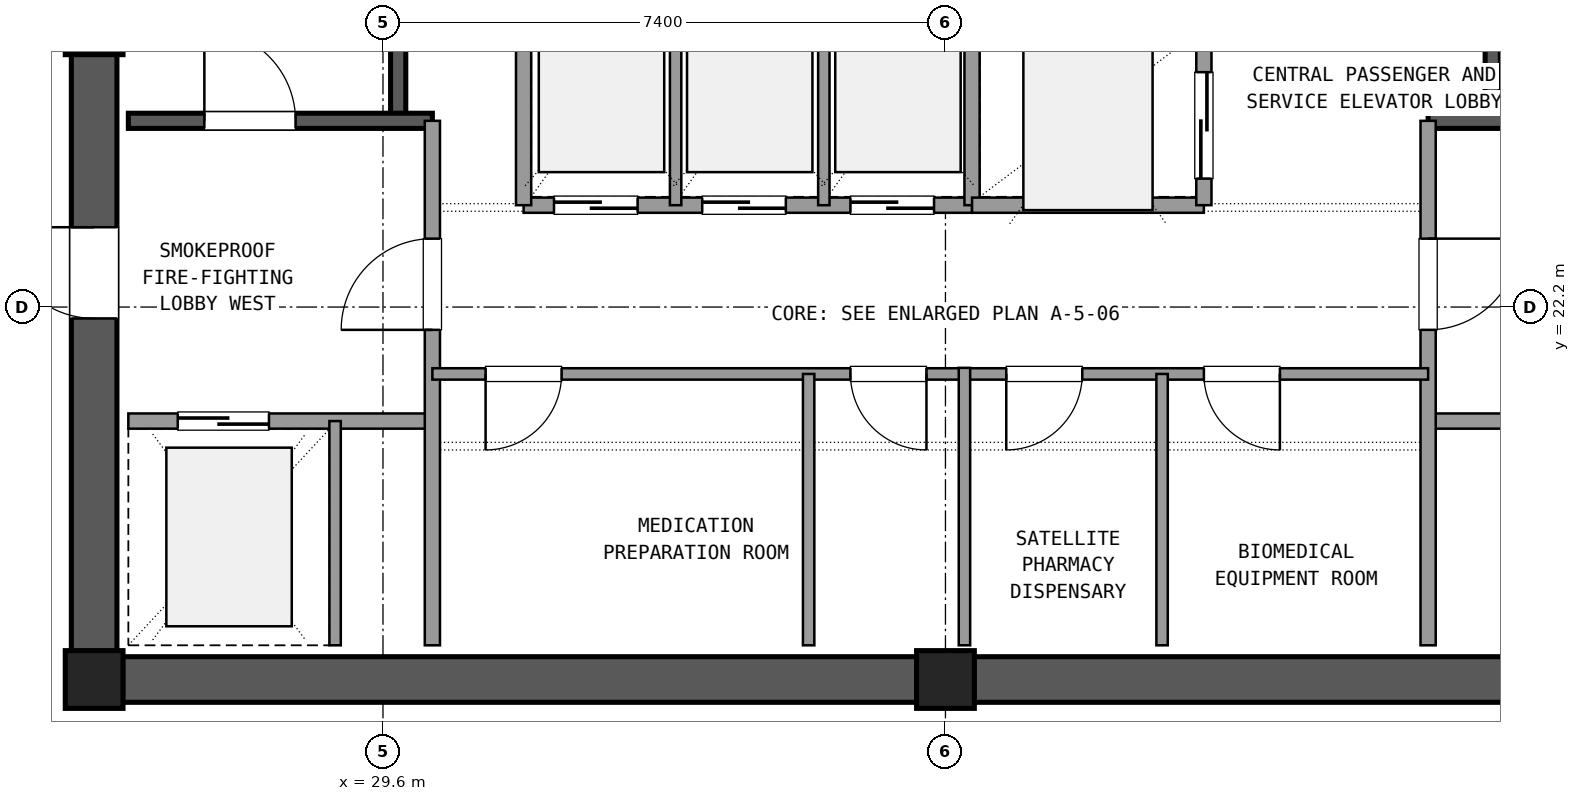
"""IFC4 building model, lengths in metres.
Left out: names, types, materials, properties, quantities, classifications, styles, units other than length and angle.
Written with IfcOpenShell. Run it as: python <this file> out.ifc"""

import sys

from ifc_helpers import new_model, si_unit, direction, frame, frame_2d, origin, origin_2d, place, context, subcontext, project, spatial, rectangle, extrude, element, fill, save


model = new_model("IFC4")
c1 = context("Model", 3, precision=1e-05, world=origin(), true_north=direction((0.0, 1.0)))
c2 = subcontext(c1, "Body", "Model", "MODEL_VIEW")
j1 = project(units=[si_unit("LENGTHUNIT", "METRE"), si_unit("PLANEANGLEUNIT", "RADIAN")], contexts=[c1])
p1 = place(None, origin())
s1 = spatial("IfcSite", under=j1, at=p1, CompositionType="ELEMENT")
p2 = place(p1, origin())
s2 = spatial("IfcBuilding", under=s1, at=p2, CompositionType="ELEMENT")
p3 = place(p2, frame((0.0, 0.0, 286.02)))
s3 = spatial("IfcBuildingStorey", under=s2, at=p3, CompositionType="ELEMENT", Elevation=286.02)
for number, where, z_axis, x_axis in (
    (1, (25.8, 17.3, 0.0), (0.0, 0.0, 1.0), (1.0, 0.0, 0.0)),
    (2, (37.0, 17.3, 0.0), (0.0, 0.0, 1.0), (1.0, 0.0, 0.0)),
    (3, (25.8, 25.9, 0.0), (0.0, 0.0, 1.0), (1.0, 0.0, 0.0)),
):
    element("IfcColumn", number, at=place(p3, frame(where, z_axis=z_axis, x_axis=x_axis)), inside=s3, PredefinedType="COLUMN", context=c2, shape_type="SweptSolid", body=[
        extrude(rectangle(XDim=0.76, YDim=0.76, at=origin_2d()), origin(), (0.0, 0.0, 1.0), 4.32),
    ])
for number, where, z_axis, x_axis in (
    (4, (26.175, 17.3, 0.0), (0.0, 0.0, 1.0), (1.0, 0.0, 0.0)),
    (5, (37.375, 17.3, 0.0), (0.0, 0.0, 1.0), (1.0, 0.0, 0.0)),
):
    element("IfcWall", number, at=place(p3, frame(where, z_axis=z_axis, x_axis=x_axis)), inside=s3, PredefinedType="SHEAR", context=c2, shape_type="SweptSolid", body=[
        extrude(rectangle(XDim=10.45, YDim=0.6, at=frame_2d((5.225, 0.0))), origin(), (0.0, 0.0, 1.0), 4.02),
    ])
p4 = place(p3, frame((25.8, 25.525, 0.0), z_axis=(0.0, 0.0, 1.0), x_axis=(0.0, -1.0, 0.0)))
e6 = element("IfcWall", 6, at=p4, inside=s3, PredefinedType="SHEAR", context=c2, shape_type="SweptSolid", body=[
    extrude(rectangle(XDim=7.85, YDim=0.6, at=frame_2d((3.925, 0.0))), origin(), (0.0, 0.0, 1.0), 4.02),
])
p5 = place(p4, frame((2.275, 0.0, 0.0)))
e7 = element("IfcOpeningElement", 7, at=p5, cuts=e6, PredefinedType="OPENING", context=c2, shape_type="SweptSolid", body=[
    extrude(rectangle(XDim=1.2, YDim=2.15, at=frame_2d((0.6, 1.075))), frame((0.0, 0.31, 0.0), z_axis=(0.0, -1.0, 0.0), x_axis=(1.0, 0.0, 0.0)), (0.0, 0.0, 1.0), 0.62),
])
p6 = place(p3, frame((29.8, 24.65, 0.0), z_axis=(0.0, 0.0, 1.0), x_axis=(0.0, 1.0, 0.0)))
e8 = element("IfcWall", 8, at=p6, inside=s3, PredefinedType="SHEAR", context=c2, shape_type="SweptSolid", body=[
    extrude(rectangle(XDim=9.4, YDim=0.2, at=frame_2d((4.7, 0.0))), origin(), (0.0, 0.0, 1.0), 4.02),
])
p7 = place(p3, frame((26.25, 24.65, 0.0), z_axis=(0.0, 0.0, 1.0), x_axis=(1.0, 0.0, 0.0)))
e9 = element("IfcWall", 9, at=p7, inside=s3, PredefinedType="SHEAR", context=c2, shape_type="SweptSolid", body=[
    extrude(rectangle(XDim=4.0, YDim=0.2, at=frame_2d((2.0, 0.0))), origin(), (0.0, 0.0, 1.0), 4.02),
])
p8 = place(p7, frame((1.0, 0.0, 0.0)))
e10 = element("IfcOpeningElement", 10, at=p8, cuts=e9, PredefinedType="OPENING", context=c2, shape_type="SweptSolid", body=[
    extrude(rectangle(XDim=1.2, YDim=2.15, at=frame_2d((0.6, 1.075))), frame((0.0, 0.11, 0.0), z_axis=(0.0, -1.0, 0.0), x_axis=(1.0, 0.0, 0.0)), (0.0, 0.0, 1.0), 0.22),
])
p9 = place(p3, frame((44.2, 24.65, 0.0), z_axis=(0.0, 0.0, 1.0), x_axis=(0.0, 1.0, 0.0)))
e11 = element("IfcWall", 11, at=p9, inside=s3, PredefinedType="SHEAR", context=c2, shape_type="SweptSolid", body=[
    extrude(rectangle(XDim=9.4, YDim=0.2, at=frame_2d((4.7, 0.0))), origin(), (0.0, 0.0, 1.0), 4.02),
])
p10 = place(p3, frame((43.35, 24.65, 0.0), z_axis=(0.0, 0.0, 1.0), x_axis=(1.0, 0.0, 0.0)))
e12 = element("IfcWall", 12, at=p10, inside=s3, PredefinedType="SHEAR", context=c2, shape_type="SweptSolid", body=[
    extrude(rectangle(XDim=4.4, YDim=0.2, at=frame_2d((2.2, 0.0))), origin(), (0.0, 0.0, 1.0), 4.02),
])
p11 = place(p10, frame((2.0, 0.0, 0.0)))
e13 = element("IfcOpeningElement", 13, at=p11, cuts=e12, PredefinedType="OPENING", context=c2, shape_type="SweptSolid", body=[
    extrude(rectangle(XDim=1.2, YDim=2.15, at=frame_2d((0.6, 1.075))), frame((0.0, 0.11, 0.0), z_axis=(0.0, -1.0, 0.0), x_axis=(1.0, 0.0, 0.0)), (0.0, 0.0, 1.0), 0.22),
])
p12 = place(p3, frame((26.25, 20.7, 0.0), z_axis=(0.0, 0.0, 1.0), x_axis=(1.0, 0.0, 0.0)))
e14 = element("IfcWall", 14, at=p12, inside=s3, PredefinedType="SOLIDWALL", context=c2, shape_type="SweptSolid", body=[
    extrude(rectangle(XDim=4.0, YDim=0.2, at=frame_2d((2.0, 0.0))), origin(), (0.0, 0.0, 1.0), 2.93),
])
p13 = place(p12, frame((0.65, 0.0, 0.0)))
e15 = element("IfcOpeningElement", 15, at=p13, cuts=e14, PredefinedType="OPENING", context=c2, shape_type="SweptSolid", body=[
    extrude(rectangle(XDim=1.2, YDim=2.15, at=frame_2d((0.6, 1.075))), frame((0.0, 0.11, 0.0), z_axis=(0.0, -1.0, 0.0), x_axis=(1.0, 0.0, 0.0)), (0.0, 0.0, 1.0), 0.22),
])
p14 = place(p3, frame((30.25, 17.75, 0.0), z_axis=(0.0, 0.0, 1.0), x_axis=(0.0, 1.0, 0.0)))
e16 = element("IfcWall", 16, at=p14, inside=s3, PredefinedType="SOLIDWALL", context=c2, shape_type="SweptSolid", body=[
    extrude(rectangle(XDim=6.9, YDim=0.2, at=frame_2d((3.45, 0.0))), origin(), (0.0, 0.0, 1.0), 2.93),
])
p15 = place(p14, frame((4.15, 0.0, 0.0)))
e17 = element("IfcOpeningElement", 17, at=p15, cuts=e16, PredefinedType="OPENING", context=c2, shape_type="SweptSolid", body=[
    extrude(rectangle(XDim=1.2, YDim=2.15, at=frame_2d((0.6, 1.075))), frame((0.0, 0.11, 0.0), z_axis=(0.0, -1.0, 0.0), x_axis=(1.0, 0.0, 0.0)), (0.0, 0.0, 1.0), 0.22),
])
p16 = place(p3, frame((28.97, 17.75, 0.0), z_axis=(0.0, 0.0, 1.0), x_axis=(0.0, 1.0, 0.0)))
e18 = element("IfcWall", 18, at=p16, inside=s3, PredefinedType="PARTITIONING", context=c2, shape_type="SweptSolid", body=[
    extrude(rectangle(XDim=2.95, YDim=0.15, at=frame_2d((1.475, 0.0))), origin(), (0.0, 0.0, 1.0), 2.93),
])
p17 = place(p3, frame((43.35, 20.7, 0.0), z_axis=(0.0, 0.0, 1.0), x_axis=(1.0, 0.0, 0.0)))
e19 = element("IfcWall", 19, at=p17, inside=s3, PredefinedType="SOLIDWALL", context=c2, shape_type="SweptSolid", body=[
    extrude(rectangle(XDim=4.4, YDim=0.2, at=frame_2d((2.2, 0.0))), origin(), (0.0, 0.0, 1.0), 2.93),
])
p18 = place(p17, frame((2.35, 0.0, 0.0)))
e20 = element("IfcOpeningElement", 20, at=p18, cuts=e19, PredefinedType="OPENING", context=c2, shape_type="SweptSolid", body=[
    extrude(rectangle(XDim=1.2, YDim=2.15, at=frame_2d((0.6, 1.075))), frame((0.0, 0.11, 0.0), z_axis=(0.0, -1.0, 0.0), x_axis=(1.0, 0.0, 0.0)), (0.0, 0.0, 1.0), 0.22),
])
p19 = place(p3, frame((43.35, 17.75, 0.0), z_axis=(0.0, 0.0, 1.0), x_axis=(0.0, 1.0, 0.0)))
e21 = element("IfcWall", 21, at=p19, inside=s3, PredefinedType="SOLIDWALL", context=c2, shape_type="SweptSolid", body=[
    extrude(rectangle(XDim=6.9, YDim=0.2, at=frame_2d((3.45, 0.0))), origin(), (0.0, 0.0, 1.0), 2.93),
])
p20 = place(p19, frame((4.15, 0.0, 0.0)))
e22 = element("IfcOpeningElement", 22, at=p20, cuts=e21, PredefinedType="OPENING", context=c2, shape_type="SweptSolid", body=[
    extrude(rectangle(XDim=1.2, YDim=2.15, at=frame_2d((0.6, 1.075))), frame((0.0, 0.11, 0.0), z_axis=(0.0, -1.0, 0.0), x_axis=(1.0, 0.0, 0.0)), (0.0, 0.0, 1.0), 0.22),
])
p21 = place(p3, frame((30.25, 21.32, 0.0), z_axis=(0.0, 0.0, 1.0), x_axis=(1.0, 0.0, 0.0)))
e23 = element("IfcWall", 23, at=p21, inside=s3, PredefinedType="PARTITIONING", context=c2, shape_type="SweptSolid", body=[
    extrude(rectangle(XDim=7.0, YDim=0.15, at=frame_2d((3.5, 0.0))), origin(), (0.0, 0.0, 1.0), 2.93),
])
p22 = place(p21, frame((0.7, 0.0, 0.0)))
e24 = element("IfcOpeningElement", 24, at=p22, cuts=e23, PredefinedType="OPENING", context=c2, shape_type="SweptSolid", body=[
    extrude(rectangle(XDim=1.0, YDim=2.15, at=frame_2d((0.5, 1.075))), frame((0.0, 0.085, 0.0), z_axis=(0.0, -1.0, 0.0), x_axis=(1.0, 0.0, 0.0)), (0.0, 0.0, 1.0), 0.17),
])
p23 = place(p21, frame((5.5, 0.0, 0.0)))
e25 = element("IfcOpeningElement", 25, at=p23, cuts=e23, PredefinedType="OPENING", context=c2, shape_type="SweptSolid", body=[
    extrude(rectangle(XDim=1.0, YDim=2.15, at=frame_2d((0.5, 1.075))), frame((0.0, 0.085, 0.0), z_axis=(0.0, -1.0, 0.0), x_axis=(1.0, 0.0, 0.0)), (0.0, 0.0, 1.0), 0.17),
])
p24 = place(p3, frame((35.2, 17.75, 0.0), z_axis=(0.0, 0.0, 1.0), x_axis=(0.0, 1.0, 0.0)))
e26 = element("IfcWall", 26, at=p24, inside=s3, PredefinedType="PARTITIONING", context=c2, shape_type="SweptSolid", body=[
    extrude(rectangle(XDim=3.57, YDim=0.15, at=frame_2d((1.785, 0.0))), origin(), (0.0, 0.0, 1.0), 2.93),
])
p25 = place(p3, frame((37.25, 21.32, 0.0), z_axis=(0.0, 0.0, 1.0), x_axis=(1.0, 0.0, 0.0)))
e27 = element("IfcWall", 27, at=p25, inside=s3, PredefinedType="PARTITIONING", context=c2, shape_type="SweptSolid", body=[
    extrude(rectangle(XDim=6.1, YDim=0.15, at=frame_2d((3.05, 0.0))), origin(), (0.0, 0.0, 1.0), 2.93),
])
p26 = place(p25, frame((0.55, 0.0, 0.0)))
e28 = element("IfcOpeningElement", 28, at=p26, cuts=e27, PredefinedType="OPENING", context=c2, shape_type="SweptSolid", body=[
    extrude(rectangle(XDim=1.0, YDim=2.15, at=frame_2d((0.5, 1.075))), frame((0.0, 0.085, 0.0), z_axis=(0.0, -1.0, 0.0), x_axis=(1.0, 0.0, 0.0)), (0.0, 0.0, 1.0), 0.17),
])
p27 = place(p25, frame((3.15, 0.0, 0.0)))
e29 = element("IfcOpeningElement", 29, at=p27, cuts=e27, PredefinedType="OPENING", context=c2, shape_type="SweptSolid", body=[
    extrude(rectangle(XDim=1.0, YDim=2.15, at=frame_2d((0.5, 1.075))), frame((0.0, 0.085, 0.0), z_axis=(0.0, -1.0, 0.0), x_axis=(1.0, 0.0, 0.0)), (0.0, 0.0, 1.0), 0.17),
])
p28 = place(p3, frame((39.85, 17.75, 0.0), z_axis=(0.0, 0.0, 1.0), x_axis=(0.0, 1.0, 0.0)))
e30 = element("IfcWall", 30, at=p28, inside=s3, PredefinedType="PARTITIONING", context=c2, shape_type="SweptSolid", body=[
    extrude(rectangle(XDim=3.57, YDim=0.15, at=frame_2d((1.785, 0.0))), origin(), (0.0, 0.0, 1.0), 2.93),
])
p29 = place(p3, frame((37.25, 17.75, 0.0), z_axis=(0.0, 0.0, 1.0), x_axis=(0.0, 1.0, 0.0)))
e31 = element("IfcWall", 31, at=p29, inside=s3, PredefinedType="PARTITIONING", context=c2, shape_type="SweptSolid", body=[
    extrude(rectangle(XDim=3.65, YDim=0.15, at=frame_2d((1.825, 0.0))), origin(), (0.0, 0.0, 1.0), 2.93),
])
p30 = place(p3, frame((31.45, 23.54, 0.0), z_axis=(0.0, 0.0, 1.0), x_axis=(1.0, 0.0, 0.0)))
e32 = element("IfcWall", 32, at=p30, inside=s3, PredefinedType="SOLIDWALL", context=c2, shape_type="SweptSolid", body=[
    extrude(rectangle(XDim=5.9, YDim=0.2, at=frame_2d((2.95, 0.0))), origin(), (0.0, 0.0, 1.0), 2.93),
])
p31 = place(p30, frame((0.4, 0.0, 0.0)))
e33 = element("IfcOpeningElement", 33, at=p31, cuts=e32, PredefinedType="OPENING", context=c2, shape_type="SweptSolid", body=[
    extrude(rectangle(XDim=1.1, YDim=2.15, at=frame_2d((0.55, 1.075))), frame((0.0, 0.11, 0.0), z_axis=(0.0, -1.0, 0.0), x_axis=(1.0, 0.0, 0.0)), (0.0, 0.0, 1.0), 0.22),
])
p32 = place(p30, frame((2.35, 0.0, 0.0)))
e34 = element("IfcOpeningElement", 34, at=p32, cuts=e32, PredefinedType="OPENING", context=c2, shape_type="SweptSolid", body=[
    extrude(rectangle(XDim=1.1, YDim=2.15, at=frame_2d((0.55, 1.075))), frame((0.0, 0.11, 0.0), z_axis=(0.0, -1.0, 0.0), x_axis=(1.0, 0.0, 0.0)), (0.0, 0.0, 1.0), 0.22),
])
p33 = place(p30, frame((4.3, 0.0, 0.0)))
e35 = element("IfcOpeningElement", 35, at=p33, cuts=e32, PredefinedType="OPENING", context=c2, shape_type="SweptSolid", body=[
    extrude(rectangle(XDim=1.1, YDim=2.15, at=frame_2d((0.55, 1.075))), frame((0.0, 0.11, 0.0), z_axis=(0.0, -1.0, 0.0), x_axis=(1.0, 0.0, 0.0)), (0.0, 0.0, 1.0), 0.22),
])
p34 = place(p3, frame((31.45, 23.54, 0.0), z_axis=(0.0, 0.0, 1.0), x_axis=(0.0, 1.0, 0.0)))
e36 = element("IfcWall", 36, at=p34, inside=s3, PredefinedType="SOLIDWALL", context=c2, shape_type="SweptSolid", body=[
    extrude(rectangle(XDim=2.81, YDim=0.2, at=frame_2d((1.405, 0.0))), origin(), (0.0, 0.0, 1.0), 2.93),
])
for number, where, z_axis, x_axis in (
    (37, (33.45, 23.54, 0.0), (0.0, 0.0, 1.0), (0.0, 1.0, 0.0)),
    (38, (35.4, 23.54, 0.0), (0.0, 0.0, 1.0), (0.0, 1.0, 0.0)),
):
    element("IfcWall", number, at=place(p3, frame(where, z_axis=z_axis, x_axis=x_axis)), inside=s3, PredefinedType="PARTITIONING", context=c2, shape_type="SweptSolid", body=[
        extrude(rectangle(XDim=2.81, YDim=0.15, at=frame_2d((1.405, 0.0))), origin(), (0.0, 0.0, 1.0), 2.93),
    ])
p35 = place(p3, frame((37.35, 23.54, 0.0), z_axis=(0.0, 0.0, 1.0), x_axis=(0.0, 1.0, 0.0)))
e39 = element("IfcWall", 39, at=p35, inside=s3, PredefinedType="SOLIDWALL", context=c2, shape_type="SweptSolid", body=[
    extrude(rectangle(XDim=6.82, YDim=0.2, at=frame_2d((3.41, 0.0))), origin(), (0.0, 0.0, 1.0), 2.93),
])
p36 = place(p3, frame((37.35, 23.54, 0.0), z_axis=(0.0, 0.0, 1.0), x_axis=(1.0, 0.0, 0.0)))
e40 = element("IfcWall", 40, at=p36, inside=s3, PredefinedType="SOLIDWALL", context=c2, shape_type="SweptSolid", body=[
    extrude(rectangle(XDim=3.05, YDim=0.2, at=frame_2d((1.525, 0.0))), origin(), (0.0, 0.0, 1.0), 2.93),
])
p37 = place(p3, frame((40.4, 23.54, 0.0), z_axis=(0.0, 0.0, 1.0), x_axis=(0.0, 1.0, 0.0)))
e41 = element("IfcWall", 41, at=p37, inside=s3, PredefinedType="SOLIDWALL", context=c2, shape_type="SweptSolid", body=[
    extrude(rectangle(XDim=6.82, YDim=0.2, at=frame_2d((3.41, 0.0))), origin(), (0.0, 0.0, 1.0), 2.93),
])
p38 = place(p37, frame((0.35, 0.0, 0.0)))
e42 = element("IfcOpeningElement", 42, at=p38, cuts=e41, PredefinedType="OPENING", context=c2, shape_type="SweptSolid", body=[
    extrude(rectangle(XDim=1.4, YDim=2.2, at=frame_2d((0.7, 1.1))), frame((0.0, 0.11, 0.0), z_axis=(0.0, -1.0, 0.0), x_axis=(1.0, 0.0, 0.0)), (0.0, 0.0, 1.0), 0.22),
])
p39 = place(p37, frame((2.65, 0.0, 0.0)))
e43 = element("IfcOpeningElement", 43, at=p39, cuts=e41, PredefinedType="OPENING", context=c2, shape_type="SweptSolid", body=[
    extrude(rectangle(XDim=1.4, YDim=2.2, at=frame_2d((0.7, 1.1))), frame((0.0, 0.11, 0.0), z_axis=(0.0, -1.0, 0.0), x_axis=(1.0, 0.0, 0.0)), (0.0, 0.0, 1.0), 0.22),
])
p40 = place(p37, frame((4.85, 0.0, 0.0)))
e44 = element("IfcOpeningElement", 44, at=p40, cuts=e41, PredefinedType="OPENING", context=c2, shape_type="SweptSolid", body=[
    extrude(rectangle(XDim=1.4, YDim=2.2, at=frame_2d((0.7, 1.1))), frame((0.0, 0.11, 0.0), z_axis=(0.0, -1.0, 0.0), x_axis=(1.0, 0.0, 0.0)), (0.0, 0.0, 1.0), 0.22),
])
p41 = place(p8, origin())
e45 = element("IfcDoor", 45, at=p41, inside=s3, OperationType="SINGLE_SWING_LEFT", PredefinedType="DOOR", context=c2, shape_type="SweptSolid", body=[
    extrude(rectangle(XDim=1.2, YDim=2.15, at=frame_2d((0.6, 1.075))), frame((0.0, 0.025, 0.0), z_axis=(0.0, -1.0, 0.0), x_axis=(1.0, 0.0, 0.0)), (0.0, 0.0, 1.0), 0.05),
])
fill(e10, e45)
p42 = place(p13, origin())
e46 = element("IfcDoor", 46, at=p42, inside=s3, OperationType="SLIDING_TO_LEFT", PredefinedType="DOOR", context=c2, shape_type="SweptSolid", body=[
    extrude(rectangle(XDim=1.2, YDim=2.15, at=frame_2d((0.6, 1.075))), frame((0.0, 0.025, 0.0), z_axis=(0.0, -1.0, 0.0), x_axis=(1.0, 0.0, 0.0)), (0.0, 0.0, 1.0), 0.05),
])
fill(e15, e46)
p43 = place(p15, origin())
e47 = element("IfcDoor", 47, at=p43, inside=s3, OperationType="SINGLE_SWING_LEFT", PredefinedType="DOOR", context=c2, shape_type="SweptSolid", body=[
    extrude(rectangle(XDim=1.2, YDim=2.15, at=frame_2d((0.6, 1.075))), frame((0.0, 0.025, 0.0), z_axis=(0.0, -1.0, 0.0), x_axis=(1.0, 0.0, 0.0)), (0.0, 0.0, 1.0), 0.05),
])
fill(e17, e47)
p44 = place(p20, frame((1.2, 0.0, 0.0), z_axis=(0.0, 0.0, 1.0), x_axis=(-1.0, 0.0, 0.0)))
e48 = element("IfcDoor", 48, at=p44, inside=s3, OperationType="SINGLE_SWING_RIGHT", PredefinedType="DOOR", context=c2, shape_type="SweptSolid", body=[
    extrude(rectangle(XDim=1.2, YDim=2.15, at=frame_2d((0.6, 1.075))), frame((0.0, 0.025, 0.0), z_axis=(0.0, -1.0, 0.0), x_axis=(1.0, 0.0, 0.0)), (0.0, 0.0, 1.0), 0.05),
])
fill(e22, e48)
p45 = place(p5, frame((1.2, 0.0, 0.0), z_axis=(0.0, 0.0, 1.0), x_axis=(-1.0, 0.0, 0.0)))
e49 = element("IfcDoor", 49, at=p45, inside=s3, OperationType="SINGLE_SWING_LEFT", PredefinedType="DOOR", context=c2, shape_type="SweptSolid", body=[
    extrude(rectangle(XDim=1.2, YDim=2.15, at=frame_2d((0.6, 1.075))), frame((0.0, 0.025, 0.0), z_axis=(0.0, -1.0, 0.0), x_axis=(1.0, 0.0, 0.0)), (0.0, 0.0, 1.0), 0.05),
])
fill(e7, e49)
p46 = place(p22, frame((1.0, 0.0, 0.0), z_axis=(0.0, 0.0, 1.0), x_axis=(-1.0, 0.0, 0.0)))
e50 = element("IfcDoor", 50, at=p46, inside=s3, OperationType="SINGLE_SWING_LEFT", PredefinedType="DOOR", context=c2, shape_type="SweptSolid", body=[
    extrude(rectangle(XDim=1.0, YDim=2.15, at=frame_2d((0.5, 1.075))), frame((0.0, 0.025, 0.0), z_axis=(0.0, -1.0, 0.0), x_axis=(1.0, 0.0, 0.0)), (0.0, 0.0, 1.0), 0.05),
])
fill(e24, e50)
p47 = place(p23, frame((1.0, 0.0, 0.0), z_axis=(0.0, 0.0, 1.0), x_axis=(-1.0, 0.0, 0.0)))
e51 = element("IfcDoor", 51, at=p47, inside=s3, OperationType="SINGLE_SWING_RIGHT", PredefinedType="DOOR", context=c2, shape_type="SweptSolid", body=[
    extrude(rectangle(XDim=1.0, YDim=2.15, at=frame_2d((0.5, 1.075))), frame((0.0, 0.025, 0.0), z_axis=(0.0, -1.0, 0.0), x_axis=(1.0, 0.0, 0.0)), (0.0, 0.0, 1.0), 0.05),
])
fill(e25, e51)
p48 = place(p26, frame((1.0, 0.0, 0.0), z_axis=(0.0, 0.0, 1.0), x_axis=(-1.0, 0.0, 0.0)))
e52 = element("IfcDoor", 52, at=p48, inside=s3, OperationType="SINGLE_SWING_LEFT", PredefinedType="DOOR", context=c2, shape_type="SweptSolid", body=[
    extrude(rectangle(XDim=1.0, YDim=2.15, at=frame_2d((0.5, 1.075))), frame((0.0, 0.025, 0.0), z_axis=(0.0, -1.0, 0.0), x_axis=(1.0, 0.0, 0.0)), (0.0, 0.0, 1.0), 0.05),
])
fill(e28, e52)
p49 = place(p27, frame((1.0, 0.0, 0.0), z_axis=(0.0, 0.0, 1.0), x_axis=(-1.0, 0.0, 0.0)))
e53 = element("IfcDoor", 53, at=p49, inside=s3, OperationType="SINGLE_SWING_RIGHT", PredefinedType="DOOR", context=c2, shape_type="SweptSolid", body=[
    extrude(rectangle(XDim=1.0, YDim=2.15, at=frame_2d((0.5, 1.075))), frame((0.0, 0.025, 0.0), z_axis=(0.0, -1.0, 0.0), x_axis=(1.0, 0.0, 0.0)), (0.0, 0.0, 1.0), 0.05),
])
fill(e29, e53)
p50 = place(p31, origin())
e54 = element("IfcDoor", 54, at=p50, inside=s3, OperationType="SLIDING_TO_RIGHT", PredefinedType="DOOR", context=c2, shape_type="SweptSolid", body=[
    extrude(rectangle(XDim=1.1, YDim=2.15, at=frame_2d((0.55, 1.075))), frame((0.0, 0.025, 0.0), z_axis=(0.0, -1.0, 0.0), x_axis=(1.0, 0.0, 0.0)), (0.0, 0.0, 1.0), 0.05),
])
fill(e33, e54)
p51 = place(p32, origin())
e55 = element("IfcDoor", 55, at=p51, inside=s3, OperationType="SLIDING_TO_RIGHT", PredefinedType="DOOR", context=c2, shape_type="SweptSolid", body=[
    extrude(rectangle(XDim=1.1, YDim=2.15, at=frame_2d((0.55, 1.075))), frame((0.0, 0.025, 0.0), z_axis=(0.0, -1.0, 0.0), x_axis=(1.0, 0.0, 0.0)), (0.0, 0.0, 1.0), 0.05),
])
fill(e34, e55)
p52 = place(p33, origin())
e56 = element("IfcDoor", 56, at=p52, inside=s3, OperationType="SLIDING_TO_RIGHT", PredefinedType="DOOR", context=c2, shape_type="SweptSolid", body=[
    extrude(rectangle(XDim=1.1, YDim=2.15, at=frame_2d((0.55, 1.075))), frame((0.0, 0.025, 0.0), z_axis=(0.0, -1.0, 0.0), x_axis=(1.0, 0.0, 0.0)), (0.0, 0.0, 1.0), 0.05),
])
fill(e35, e56)
p53 = place(p38, origin())
e57 = element("IfcDoor", 57, at=p53, inside=s3, OperationType="SLIDING_TO_LEFT", PredefinedType="DOOR", context=c2, shape_type="SweptSolid", body=[
    extrude(rectangle(XDim=1.4, YDim=2.2, at=frame_2d((0.7, 1.1))), frame((0.0, 0.025, 0.0), z_axis=(0.0, -1.0, 0.0), x_axis=(1.0, 0.0, 0.0)), (0.0, 0.0, 1.0), 0.05),
])
fill(e42, e57)
save(model, sys.argv[1])
